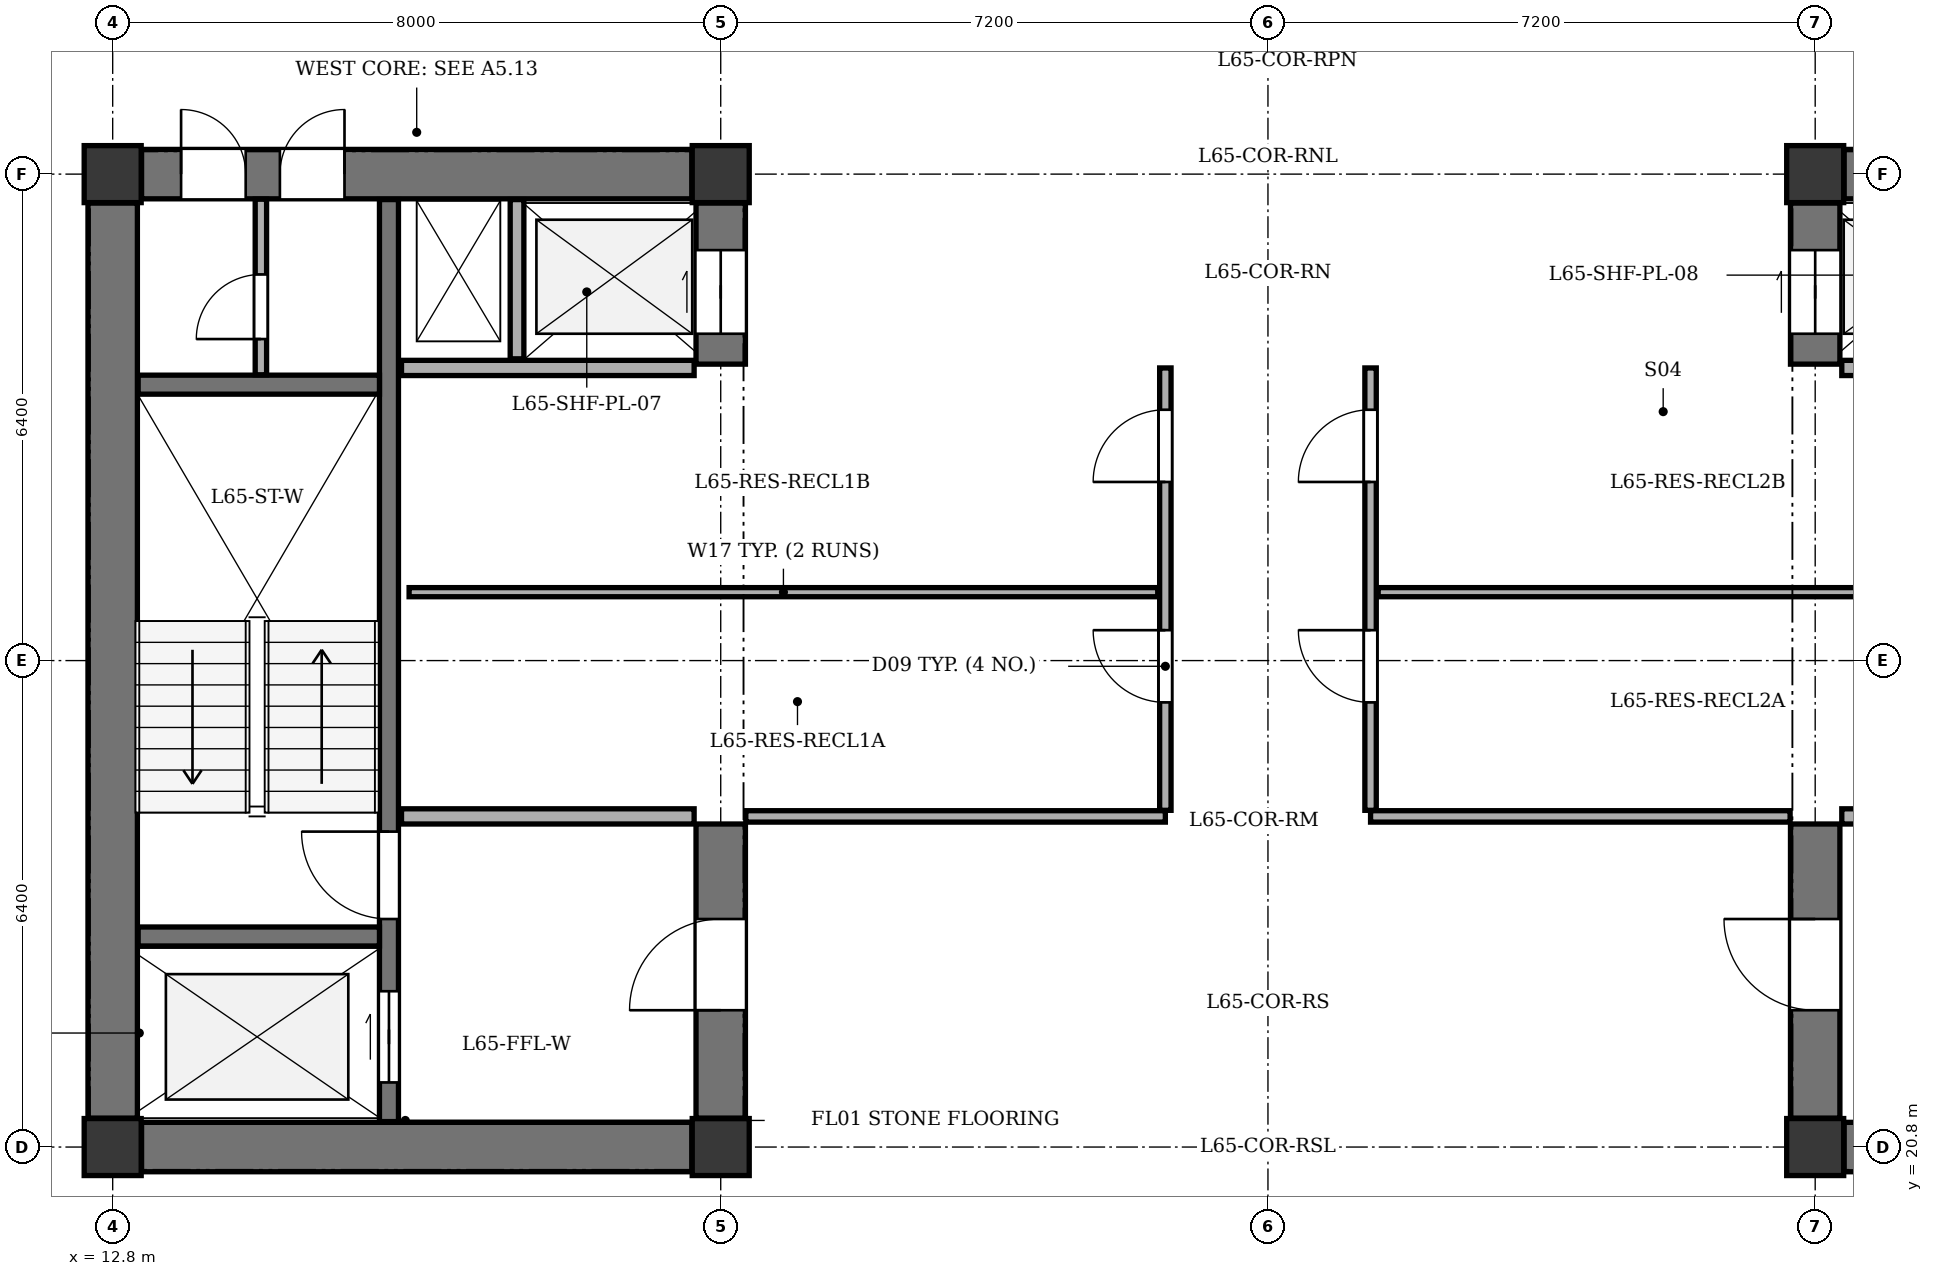
"""IFC4 building model, lengths in metres.
Left out: names, types, materials, properties, quantities, classifications, styles, units other than length and angle.
Written with IfcOpenShell. Run it as: python <this file> out.ifc"""

import sys

from ifc_helpers import new_model, si_unit, direction, frame, frame_2d, origin, origin_2d, place, context, subcontext, project, spatial, rectangle, extrude, element, fill, save


model = new_model("IFC4")
c1 = context("Model", 3, precision=1e-05, world=origin(), true_north=direction((0.0, 1.0)))
c2 = subcontext(c1, "Body", "Model", "MODEL_VIEW")
j1 = project(units=[si_unit("LENGTHUNIT", "METRE"), si_unit("PLANEANGLEUNIT", "RADIAN")], contexts=[c1])
p1 = place(None, origin())
s1 = spatial("IfcSite", under=j1, at=p1, CompositionType="ELEMENT")
p2 = place(p1, origin())
s2 = spatial("IfcBuilding", under=s1, at=p2, CompositionType="ELEMENT")
p3 = place(p2, frame((0.0, 0.0, 248.3)))
s3 = spatial("IfcBuildingStorey", under=s2, at=p3, CompositionType="ELEMENT", Elevation=248.3)
for number, where, z_axis, x_axis in (
    (1, (12.8, 20.8, 0.0), (0.0, 0.0, 1.0), (1.0, 0.0, 0.0)),
    (2, (20.8, 20.8, 0.0), (0.0, 0.0, 1.0), (1.0, 0.0, 0.0)),
    (3, (12.8, 33.6, 0.0), (0.0, 0.0, 1.0), (1.0, 0.0, 0.0)),
    (4, (20.8, 33.6, 0.0), (0.0, 0.0, 1.0), (1.0, 0.0, 0.0)),
    (5, (35.2, 20.8, 0.0), (0.0, 0.0, 1.0), (1.0, 0.0, 0.0)),
    (6, (35.2, 33.6, 0.0), (0.0, 0.0, 1.0), (1.0, 0.0, 0.0)),
):
    element("IfcColumn", number, at=place(p3, frame(where, z_axis=z_axis, x_axis=x_axis)), inside=s3, PredefinedType="COLUMN", context=c2, shape_type="SweptSolid", body=[
        extrude(rectangle(XDim=0.75, YDim=0.75, at=origin_2d()), origin(), (0.0, 0.0, 1.0), 3.4),
    ])
p4 = place(p3, frame((12.8, 21.18, 0.0), z_axis=(0.0, 0.0, 1.0), x_axis=(0.0, 1.0, 0.0)))
e7 = element("IfcWall", 7, at=p4, inside=s3, PredefinedType="SHEAR", context=c2, shape_type="SweptSolid", body=[
    extrude(rectangle(XDim=12.04, YDim=0.65, at=frame_2d((6.02, 0.0))), origin(), (0.0, 0.0, 1.0), 3.1),
])
p5 = place(p3, frame((13.18, 20.8, 0.0), z_axis=(0.0, 0.0, 1.0), x_axis=(1.0, 0.0, 0.0)))
e8 = element("IfcWall", 8, at=p5, inside=s3, PredefinedType="SHEAR", context=c2, shape_type="SweptSolid", body=[
    extrude(rectangle(XDim=7.24, YDim=0.65, at=frame_2d((3.62, 0.0))), origin(), (0.0, 0.0, 1.0), 3.1),
])
p6 = place(p3, frame((13.18, 33.6, 0.0), z_axis=(0.0, 0.0, 1.0), x_axis=(1.0, 0.0, 0.0)))
e9 = element("IfcWall", 9, at=p6, inside=s3, PredefinedType="SHEAR", context=c2, shape_type="SweptSolid", body=[
    extrude(rectangle(XDim=7.24, YDim=0.65, at=frame_2d((3.62, 0.0))), origin(), (0.0, 0.0, 1.0), 3.1),
])
p7 = place(p6, frame((0.52, 0.0, 0.0)))
e10 = element("IfcOpeningElement", 10, at=p7, cuts=e9, PredefinedType="OPENING", context=c2, shape_type="SweptSolid", body=[
    extrude(rectangle(XDim=0.85, YDim=2.02, at=frame_2d((0.425, 1.01))), frame((0.0, 0.335, 0.0), z_axis=(0.0, -1.0, 0.0), x_axis=(1.0, 0.0, 0.0)), (0.0, 0.0, 1.0), 0.67),
])
p8 = place(p6, frame((1.82, 0.0, 0.0)))
e11 = element("IfcOpeningElement", 11, at=p8, cuts=e9, PredefinedType="OPENING", context=c2, shape_type="SweptSolid", body=[
    extrude(rectangle(XDim=0.85, YDim=2.02, at=frame_2d((0.425, 1.01))), frame((0.0, 0.335, 0.0), z_axis=(0.0, -1.0, 0.0), x_axis=(1.0, 0.0, 0.0)), (0.0, 0.0, 1.0), 0.67),
])
p9 = place(p3, frame((20.8, 21.18, 0.0), z_axis=(0.0, 0.0, 1.0), x_axis=(0.0, 1.0, 0.0)))
e12 = element("IfcWall", 12, at=p9, inside=s3, PredefinedType="SHEAR", context=c2, shape_type="SweptSolid", body=[
    extrude(rectangle(XDim=3.87, YDim=0.65, at=frame_2d((1.935, 0.0))), origin(), (0.0, 0.0, 1.0), 3.1),
])
p10 = place(p9, frame((1.42, 0.0, 0.0)))
e13 = element("IfcOpeningElement", 13, at=p10, cuts=e12, PredefinedType="OPENING", context=c2, shape_type="SweptSolid", body=[
    extrude(rectangle(XDim=1.2, YDim=2.15, at=frame_2d((0.6, 1.075))), frame((0.0, 0.335, 0.0), z_axis=(0.0, -1.0, 0.0), x_axis=(1.0, 0.0, 0.0)), (0.0, 0.0, 1.0), 0.67),
])
p11 = place(p3, frame((20.8, 31.1, 0.0), z_axis=(0.0, 0.0, 1.0), x_axis=(0.0, 1.0, 0.0)))
e14 = element("IfcWall", 14, at=p11, inside=s3, PredefinedType="SHEAR", context=c2, shape_type="SweptSolid", body=[
    extrude(rectangle(XDim=2.12, YDim=0.65, at=frame_2d((1.06, 0.0))), origin(), (0.0, 0.0, 1.0), 3.1),
])
p12 = place(p11, frame((0.4, 0.0, 0.0)))
e15 = element("IfcOpeningElement", 15, at=p12, cuts=e14, PredefinedType="OPENING", context=c2, shape_type="SweptSolid", body=[
    extrude(rectangle(XDim=1.1, YDim=2.1, at=frame_2d((0.55, 1.05))), frame((0.0, 0.335, 0.0), z_axis=(0.0, -1.0, 0.0), x_axis=(1.0, 0.0, 0.0)), (0.0, 0.0, 1.0), 0.67),
])
p13 = place(p3, frame((16.435, 21.135, 0.0), z_axis=(0.0, 0.0, 1.0), x_axis=(0.0, 1.0, 0.0)))
e16 = element("IfcWall", 16, at=p13, inside=s3, PredefinedType="SHEAR", context=c2, shape_type="SweptSolid", body=[
    extrude(rectangle(XDim=12.13, YDim=0.25, at=frame_2d((6.065, 0.0))), origin(), (0.0, 0.0, 1.0), 3.1),
])
p14 = place(p13, frame((0.515, 0.0, 0.0)))
e17 = element("IfcOpeningElement", 17, at=p14, cuts=e16, PredefinedType="OPENING", context=c2, shape_type="SweptSolid", body=[
    extrude(rectangle(XDim=1.2, YDim=2.15, at=frame_2d((0.6, 1.075))), frame((0.0, 0.135, 0.0), z_axis=(0.0, -1.0, 0.0), x_axis=(1.0, 0.0, 0.0)), (0.0, 0.0, 1.0), 0.27),
])
p15 = place(p13, frame((2.665, 0.0, 0.0)))
e18 = element("IfcOpeningElement", 18, at=p15, cuts=e16, PredefinedType="OPENING", context=c2, shape_type="SweptSolid", body=[
    extrude(rectangle(XDim=1.15, YDim=2.15, at=frame_2d((0.575, 1.075))), frame((0.0, 0.135, 0.0), z_axis=(0.0, -1.0, 0.0), x_axis=(1.0, 0.0, 0.0)), (0.0, 0.0, 1.0), 0.27),
])
for number, where, z_axis, x_axis in (
    (19, (13.135, 23.57, 0.0), (0.0, 0.0, 1.0), (1.0, 0.0, 0.0)),
    (20, (13.135, 30.83, 0.0), (0.0, 0.0, 1.0), (1.0, 0.0, 0.0)),
):
    element("IfcWall", number, at=place(p3, frame(where, z_axis=z_axis, x_axis=x_axis)), inside=s3, PredefinedType="SHEAR", context=c2, shape_type="SweptSolid", body=[
        extrude(rectangle(XDim=3.175, YDim=0.25, at=frame_2d((1.587, 0.0))), origin(), (0.0, 0.0, 1.0), 3.1),
    ])
for number, where, z_axis, x_axis in (
    (21, (16.6, 25.15, 0.0), (0.0, 0.0, 1.0), (1.0, 0.0, 0.0)),
    (22, (16.6, 31.05, 0.0), (0.0, 0.0, 1.0), (1.0, 0.0, 0.0)),
):
    element("IfcWall", number, at=place(p3, frame(where, z_axis=z_axis, x_axis=x_axis)), inside=s3, PredefinedType="SOLIDWALL", context=c2, shape_type="SweptSolid", body=[
        extrude(rectangle(XDim=3.85, YDim=0.2, at=frame_2d((1.925, 0.0))), origin(), (0.0, 0.0, 1.0), 3.1),
    ])
p16 = place(p3, frame((18.12, 31.17, 0.0), z_axis=(0.0, 0.0, 1.0), x_axis=(0.0, 1.0, 0.0)))
e23 = element("IfcWall", 23, at=p16, inside=s3, PredefinedType="PARTITIONING", context=c2, shape_type="SweptSolid", body=[
    extrude(rectangle(XDim=2.095, YDim=0.18, at=frame_2d((1.047, 0.0))), origin(), (0.0, 0.0, 1.0), 3.1),
])
p17 = place(p3, frame((35.58, 20.8, 0.0), z_axis=(0.0, 0.0, 1.0), x_axis=(1.0, 0.0, 0.0)))
e24 = element("IfcWall", 24, at=p17, inside=s3, PredefinedType="SHEAR", context=c2, shape_type="SweptSolid", body=[
    extrude(rectangle(XDim=7.24, YDim=0.65, at=frame_2d((3.62, 0.0))), origin(), (0.0, 0.0, 1.0), 3.1),
])
p18 = place(p3, frame((35.58, 33.6, 0.0), z_axis=(0.0, 0.0, 1.0), x_axis=(1.0, 0.0, 0.0)))
e25 = element("IfcWall", 25, at=p18, inside=s3, PredefinedType="SHEAR", context=c2, shape_type="SweptSolid", body=[
    extrude(rectangle(XDim=7.24, YDim=0.65, at=frame_2d((3.62, 0.0))), origin(), (0.0, 0.0, 1.0), 3.1),
])
p19 = place(p18, frame((4.82, 0.0, 0.0)))
e26 = element("IfcOpeningElement", 26, at=p19, cuts=e25, PredefinedType="OPENING", context=c2, shape_type="SweptSolid", body=[
    extrude(rectangle(XDim=1.3, YDim=2.15, at=frame_2d((0.65, 1.075))), frame((0.0, 0.335, 0.0), z_axis=(0.0, -1.0, 0.0), x_axis=(1.0, 0.0, 0.0)), (0.0, 0.0, 1.0), 0.67),
])
p20 = place(p18, frame((2.62, 0.0, 0.0)))
e27 = element("IfcOpeningElement", 27, at=p20, cuts=e25, PredefinedType="OPENING", context=c2, shape_type="SweptSolid", body=[
    extrude(rectangle(XDim=0.85, YDim=2.02, at=frame_2d((0.425, 1.01))), frame((0.0, 0.335, 0.0), z_axis=(0.0, -1.0, 0.0), x_axis=(1.0, 0.0, 0.0)), (0.0, 0.0, 1.0), 0.67),
])
p21 = place(p3, frame((35.2, 21.18, 0.0), z_axis=(0.0, 0.0, 1.0), x_axis=(0.0, 1.0, 0.0)))
e28 = element("IfcWall", 28, at=p21, inside=s3, PredefinedType="SHEAR", context=c2, shape_type="SweptSolid", body=[
    extrude(rectangle(XDim=3.87, YDim=0.65, at=frame_2d((1.935, 0.0))), origin(), (0.0, 0.0, 1.0), 3.1),
])
p22 = place(p21, frame((1.42, 0.0, 0.0)))
e29 = element("IfcOpeningElement", 29, at=p22, cuts=e28, PredefinedType="OPENING", context=c2, shape_type="SweptSolid", body=[
    extrude(rectangle(XDim=1.2, YDim=2.15, at=frame_2d((0.6, 1.075))), frame((0.0, 0.335, 0.0), z_axis=(0.0, -1.0, 0.0), x_axis=(1.0, 0.0, 0.0)), (0.0, 0.0, 1.0), 0.67),
])
p23 = place(p3, frame((35.2, 31.1, 0.0), z_axis=(0.0, 0.0, 1.0), x_axis=(0.0, 1.0, 0.0)))
e30 = element("IfcWall", 30, at=p23, inside=s3, PredefinedType="SHEAR", context=c2, shape_type="SweptSolid", body=[
    extrude(rectangle(XDim=2.12, YDim=0.65, at=frame_2d((1.06, 0.0))), origin(), (0.0, 0.0, 1.0), 3.1),
])
p24 = place(p23, frame((0.4, 0.0, 0.0)))
e31 = element("IfcOpeningElement", 31, at=p24, cuts=e30, PredefinedType="OPENING", context=c2, shape_type="SweptSolid", body=[
    extrude(rectangle(XDim=1.1, YDim=2.1, at=frame_2d((0.55, 1.05))), frame((0.0, 0.335, 0.0), z_axis=(0.0, -1.0, 0.0), x_axis=(1.0, 0.0, 0.0)), (0.0, 0.0, 1.0), 0.67),
])
p25 = place(p3, frame((35.55, 25.15, 0.0), z_axis=(0.0, 0.0, 1.0), x_axis=(1.0, 0.0, 0.0)))
e32 = element("IfcWall", 32, at=p25, inside=s3, PredefinedType="SOLIDWALL", context=c2, shape_type="SweptSolid", body=[
    extrude(rectangle(XDim=3.85, YDim=0.2, at=frame_2d((1.925, 0.0))), origin(), (0.0, 0.0, 1.0), 3.1),
])
p26 = place(p3, frame((35.55, 31.05, 0.0), z_axis=(0.0, 0.0, 1.0), x_axis=(1.0, 0.0, 0.0)))
e33 = element("IfcWall", 33, at=p26, inside=s3, PredefinedType="SOLIDWALL", context=c2, shape_type="SweptSolid", body=[
    extrude(rectangle(XDim=2.25, YDim=0.2, at=frame_2d((1.125, 0.0))), origin(), (0.0, 0.0, 1.0), 3.1),
])
p27 = place(p3, frame((14.75, 30.96, 0.0), z_axis=(0.0, 0.0, 1.0), x_axis=(0.0, 1.0, 0.0)))
e34 = element("IfcWall", 34, at=p27, inside=s3, PredefinedType="PARTITIONING", context=c2, shape_type="SweptSolid", body=[
    extrude(rectangle(XDim=2.31, YDim=0.15, at=frame_2d((1.155, 0.0))), origin(), (0.0, 0.0, 1.0), 3.1),
])
p28 = place(p27, frame((0.47, 0.0, 0.0)))
e35 = element("IfcOpeningElement", 35, at=p28, cuts=e34, PredefinedType="OPENING", context=c2, shape_type="SweptSolid", body=[
    extrude(rectangle(XDim=0.85, YDim=2.02, at=frame_2d((0.425, 1.01))), frame((0.0, 0.085, 0.0), z_axis=(0.0, -1.0, 0.0), x_axis=(1.0, 0.0, 0.0)), (0.0, 0.0, 1.0), 0.17),
])
for number, where, z_axis, x_axis in (
    (36, (21.13, 25.15, 0.0), (0.0, 0.0, 1.0), (1.0, 0.0, 0.0)),
    (37, (29.35, 25.15, 0.0), (0.0, 0.0, 1.0), (1.0, 0.0, 0.0)),
):
    element("IfcWall", number, at=place(p3, frame(where, z_axis=z_axis, x_axis=x_axis)), inside=s3, PredefinedType="PARTITIONING", context=c2, shape_type="SweptSolid", body=[
        extrude(rectangle(XDim=5.52, YDim=0.15, at=frame_2d((2.76, 0.0))), origin(), (0.0, 0.0, 1.0), 3.1),
    ])
p29 = place(p3, frame((26.65, 25.23, 0.0), z_axis=(0.0, 0.0, 1.0), x_axis=(0.0, 1.0, 0.0)))
e38 = element("IfcWall", 38, at=p29, inside=s3, PredefinedType="PARTITIONING", context=c2, shape_type="SweptSolid", body=[
    extrude(rectangle(XDim=5.82, YDim=0.15, at=frame_2d((2.91, 0.0))), origin(), (0.0, 0.0, 1.0), 3.1),
])
p30 = place(p29, frame((1.42, 0.0, 0.0)))
e39 = element("IfcOpeningElement", 39, at=p30, cuts=e38, PredefinedType="OPENING", context=c2, shape_type="SweptSolid", body=[
    extrude(rectangle(XDim=0.95, YDim=2.1, at=frame_2d((0.475, 1.05))), frame((0.0, 0.085, 0.0), z_axis=(0.0, -1.0, 0.0), x_axis=(1.0, 0.0, 0.0)), (0.0, 0.0, 1.0), 0.17),
])
p31 = place(p29, frame((4.32, 0.0, 0.0)))
e40 = element("IfcOpeningElement", 40, at=p31, cuts=e38, PredefinedType="OPENING", context=c2, shape_type="SweptSolid", body=[
    extrude(rectangle(XDim=0.95, YDim=2.1, at=frame_2d((0.475, 1.05))), frame((0.0, 0.085, 0.0), z_axis=(0.0, -1.0, 0.0), x_axis=(1.0, 0.0, 0.0)), (0.0, 0.0, 1.0), 0.17),
])
p32 = place(p3, frame((16.7, 28.1, 0.0), z_axis=(0.0, 0.0, 1.0), x_axis=(1.0, 0.0, 0.0)))
e41 = element("IfcWall", 41, at=p32, inside=s3, PredefinedType="PARTITIONING", context=c2, shape_type="SweptSolid", body=[
    extrude(rectangle(XDim=9.85, YDim=0.12, at=frame_2d((4.925, 0.0))), origin(), (0.0, 0.0, 1.0), 3.1),
])
p33 = place(p3, frame((29.35, 25.23, 0.0), z_axis=(0.0, 0.0, 1.0), x_axis=(0.0, 1.0, 0.0)))
e42 = element("IfcWall", 42, at=p33, inside=s3, PredefinedType="PARTITIONING", context=c2, shape_type="SweptSolid", body=[
    extrude(rectangle(XDim=5.82, YDim=0.15, at=frame_2d((2.91, 0.0))), origin(), (0.0, 0.0, 1.0), 3.1),
])
p34 = place(p33, frame((1.42, 0.0, 0.0)))
e43 = element("IfcOpeningElement", 43, at=p34, cuts=e42, PredefinedType="OPENING", context=c2, shape_type="SweptSolid", body=[
    extrude(rectangle(XDim=0.95, YDim=2.1, at=frame_2d((0.475, 1.05))), frame((0.0, 0.085, 0.0), z_axis=(0.0, -1.0, 0.0), x_axis=(1.0, 0.0, 0.0)), (0.0, 0.0, 1.0), 0.17),
])
p35 = place(p33, frame((4.32, 0.0, 0.0)))
e44 = element("IfcOpeningElement", 44, at=p35, cuts=e42, PredefinedType="OPENING", context=c2, shape_type="SweptSolid", body=[
    extrude(rectangle(XDim=0.95, YDim=2.1, at=frame_2d((0.475, 1.05))), frame((0.0, 0.085, 0.0), z_axis=(0.0, -1.0, 0.0), x_axis=(1.0, 0.0, 0.0)), (0.0, 0.0, 1.0), 0.17),
])
p36 = place(p3, frame((29.45, 28.1, 0.0), z_axis=(0.0, 0.0, 1.0), x_axis=(1.0, 0.0, 0.0)))
e45 = element("IfcWall", 45, at=p36, inside=s3, PredefinedType="PARTITIONING", context=c2, shape_type="SweptSolid", body=[
    extrude(rectangle(XDim=8.345, YDim=0.12, at=frame_2d((4.172, 0.0))), origin(), (0.0, 0.0, 1.0), 3.1),
])
p37 = place(p7, origin())
e46 = element("IfcDoor", 46, at=p37, inside=s3, OperationType="SINGLE_SWING_LEFT", PredefinedType="DOOR", context=c2, shape_type="SweptSolid", body=[
    extrude(rectangle(XDim=0.85, YDim=2.02, at=frame_2d((0.425, 1.01))), frame((0.0, 0.025, 0.0), z_axis=(0.0, -1.0, 0.0), x_axis=(1.0, 0.0, 0.0)), (0.0, 0.0, 1.0), 0.05),
])
fill(e10, e46)
p38 = place(p8, origin())
e47 = element("IfcDoor", 47, at=p38, inside=s3, OperationType="SINGLE_SWING_RIGHT", PredefinedType="DOOR", context=c2, shape_type="SweptSolid", body=[
    extrude(rectangle(XDim=0.85, YDim=2.02, at=frame_2d((0.425, 1.01))), frame((0.0, 0.025, 0.0), z_axis=(0.0, -1.0, 0.0), x_axis=(1.0, 0.0, 0.0)), (0.0, 0.0, 1.0), 0.05),
])
fill(e11, e47)
p39 = place(p10, origin())
e48 = element("IfcDoor", 48, at=p39, inside=s3, OperationType="SINGLE_SWING_LEFT", PredefinedType="DOOR", context=c2, shape_type="SweptSolid", body=[
    extrude(rectangle(XDim=1.2, YDim=2.15, at=frame_2d((0.6, 1.075))), frame((0.0, 0.025, 0.0), z_axis=(0.0, -1.0, 0.0), x_axis=(1.0, 0.0, 0.0)), (0.0, 0.0, 1.0), 0.05),
])
fill(e13, e48)
p40 = place(p12, origin())
e49 = element("IfcDoor", 49, at=p40, inside=s3, OperationType="DOUBLE_DOOR_SLIDING", PredefinedType="DOOR", context=c2, shape_type="SweptSolid", body=[
    extrude(rectangle(XDim=1.1, YDim=2.1, at=frame_2d((0.55, 1.05))), frame((0.0, 0.025, 0.0), z_axis=(0.0, -1.0, 0.0), x_axis=(1.0, 0.0, 0.0)), (0.0, 0.0, 1.0), 0.05),
])
fill(e15, e49)
p41 = place(p14, origin())
e50 = element("IfcDoor", 50, at=p41, inside=s3, OperationType="DOUBLE_DOOR_SLIDING", PredefinedType="DOOR", context=c2, shape_type="SweptSolid", body=[
    extrude(rectangle(XDim=1.2, YDim=2.15, at=frame_2d((0.6, 1.075))), frame((0.0, 0.025, 0.0), z_axis=(0.0, -1.0, 0.0), x_axis=(1.0, 0.0, 0.0)), (0.0, 0.0, 1.0), 0.05),
])
fill(e17, e50)
p42 = place(p15, origin())
e51 = element("IfcDoor", 51, at=p42, inside=s3, OperationType="SINGLE_SWING_RIGHT", PredefinedType="DOOR", context=c2, shape_type="SweptSolid", body=[
    extrude(rectangle(XDim=1.15, YDim=2.15, at=frame_2d((0.575, 1.075))), frame((0.0, 0.025, 0.0), z_axis=(0.0, -1.0, 0.0), x_axis=(1.0, 0.0, 0.0)), (0.0, 0.0, 1.0), 0.05),
])
fill(e18, e51)
p43 = place(p22, origin())
e52 = element("IfcDoor", 52, at=p43, inside=s3, OperationType="SINGLE_SWING_RIGHT", PredefinedType="DOOR", context=c2, shape_type="SweptSolid", body=[
    extrude(rectangle(XDim=1.2, YDim=2.15, at=frame_2d((0.6, 1.075))), frame((0.0, 0.025, 0.0), z_axis=(0.0, -1.0, 0.0), x_axis=(1.0, 0.0, 0.0)), (0.0, 0.0, 1.0), 0.05),
])
fill(e29, e52)
p44 = place(p24, origin())
e53 = element("IfcDoor", 53, at=p44, inside=s3, OperationType="DOUBLE_DOOR_SLIDING", PredefinedType="DOOR", context=c2, shape_type="SweptSolid", body=[
    extrude(rectangle(XDim=1.1, YDim=2.1, at=frame_2d((0.55, 1.05))), frame((0.0, 0.025, 0.0), z_axis=(0.0, -1.0, 0.0), x_axis=(1.0, 0.0, 0.0)), (0.0, 0.0, 1.0), 0.05),
])
fill(e31, e53)
p45 = place(p28, origin())
e54 = element("IfcDoor", 54, at=p45, inside=s3, OperationType="SINGLE_SWING_LEFT", PredefinedType="DOOR", context=c2, shape_type="SweptSolid", body=[
    extrude(rectangle(XDim=0.85, YDim=2.02, at=frame_2d((0.425, 1.01))), frame((0.0, 0.025, 0.0), z_axis=(0.0, -1.0, 0.0), x_axis=(1.0, 0.0, 0.0)), (0.0, 0.0, 1.0), 0.05),
])
fill(e35, e54)
p46 = place(p30, origin())
e55 = element("IfcDoor", 55, at=p46, inside=s3, OperationType="SINGLE_SWING_RIGHT", PredefinedType="DOOR", context=c2, shape_type="SweptSolid", body=[
    extrude(rectangle(XDim=0.95, YDim=2.1, at=frame_2d((0.475, 1.05))), frame((0.0, 0.025, 0.0), z_axis=(0.0, -1.0, 0.0), x_axis=(1.0, 0.0, 0.0)), (0.0, 0.0, 1.0), 0.05),
])
fill(e39, e55)
p47 = place(p31, origin())
e56 = element("IfcDoor", 56, at=p47, inside=s3, OperationType="SINGLE_SWING_LEFT", PredefinedType="DOOR", context=c2, shape_type="SweptSolid", body=[
    extrude(rectangle(XDim=0.95, YDim=2.1, at=frame_2d((0.475, 1.05))), frame((0.0, 0.025, 0.0), z_axis=(0.0, -1.0, 0.0), x_axis=(1.0, 0.0, 0.0)), (0.0, 0.0, 1.0), 0.05),
])
fill(e40, e56)
p48 = place(p34, origin())
e57 = element("IfcDoor", 57, at=p48, inside=s3, OperationType="SINGLE_SWING_RIGHT", PredefinedType="DOOR", context=c2, shape_type="SweptSolid", body=[
    extrude(rectangle(XDim=0.95, YDim=2.1, at=frame_2d((0.475, 1.05))), frame((0.0, 0.025, 0.0), z_axis=(0.0, -1.0, 0.0), x_axis=(1.0, 0.0, 0.0)), (0.0, 0.0, 1.0), 0.05),
])
fill(e43, e57)
p49 = place(p35, origin())
e58 = element("IfcDoor", 58, at=p49, inside=s3, OperationType="SINGLE_SWING_LEFT", PredefinedType="DOOR", context=c2, shape_type="SweptSolid", body=[
    extrude(rectangle(XDim=0.95, YDim=2.1, at=frame_2d((0.475, 1.05))), frame((0.0, 0.025, 0.0), z_axis=(0.0, -1.0, 0.0), x_axis=(1.0, 0.0, 0.0)), (0.0, 0.0, 1.0), 0.05),
])
fill(e44, e58)
save(model, sys.argv[1])
